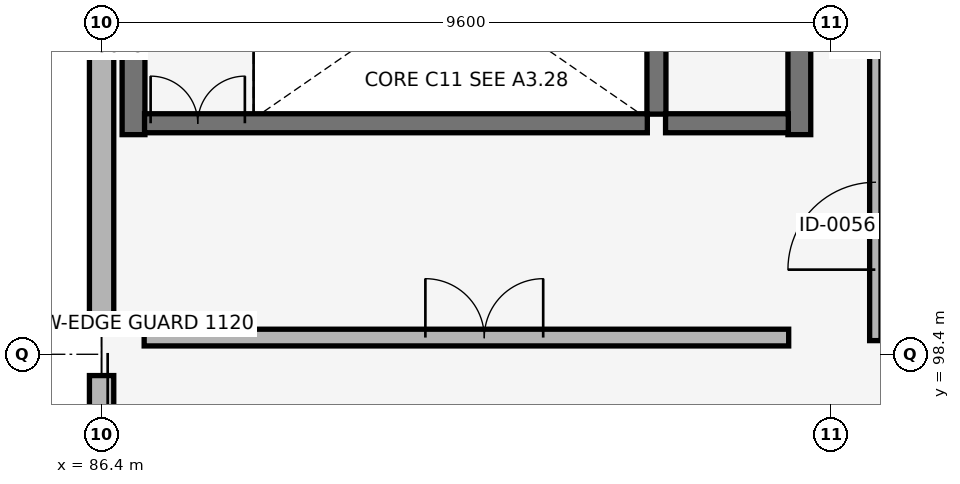
"""IFC4 building model, lengths in metres.
Left out: names, types, materials, properties, quantities, classifications, styles, units other than length and angle.
Written with IfcOpenShell. Run it as: python <this file> out.ifc"""

import sys

from ifc_helpers import new_model, si_unit, direction, frame, frame_2d, origin, place, context, subcontext, project, spatial, rectangle, extrude, element, fill, save


model = new_model("IFC4")
c1 = context("Model", 3, precision=1e-05, world=origin(), true_north=direction((0.0, 1.0)))
c2 = subcontext(c1, "Body", "Model", "MODEL_VIEW")
j1 = project(units=[si_unit("LENGTHUNIT", "METRE"), si_unit("PLANEANGLEUNIT", "RADIAN")], contexts=[c1])
p1 = place(None, origin())
s1 = spatial("IfcSite", under=j1, at=p1, CompositionType="ELEMENT")
p2 = place(p1, origin())
s2 = spatial("IfcBuilding", under=s1, at=p2, CompositionType="ELEMENT")
p3 = place(p2, frame((0.0, 0.0, 4.42)))
s3 = spatial("IfcBuildingStorey", under=s2, at=p3, CompositionType="ELEMENT", Elevation=4.42)
p4 = place(p3, frame((86.4, 98.12, 0.0), z_axis=(0.0, 0.0, 1.0), x_axis=(0.0, -1.0, 0.0)))
e1 = element("IfcWall", 1, at=p4, inside=s3, PredefinedType="SOLIDWALL", context=c2, shape_type="SweptSolid", body=[
    extrude(rectangle(XDim=6.64, YDim=0.32, at=frame_2d((3.32, 0.0))), origin(), (0.0, 0.0, 1.0), 3.63),
])
p5 = place(p4, frame((1.538, 0.0, 0.72)))
e2 = element("IfcOpeningElement", 2, at=p5, cuts=e1, PredefinedType="OPENING", context=c2, shape_type="SweptSolid", body=[
    extrude(rectangle(XDim=1.35, YDim=2.42, at=frame_2d((0.675, 1.21))), frame((0.0, 0.17, 0.0), z_axis=(0.0, -1.0, 0.0), x_axis=(1.0, 0.0, 0.0)), (0.0, 0.0, 1.0), 0.34),
])
p6 = place(p4, frame((3.752, 0.0, 0.72)))
e3 = element("IfcOpeningElement", 3, at=p6, cuts=e1, PredefinedType="OPENING", context=c2, shape_type="SweptSolid", body=[
    extrude(rectangle(XDim=1.35, YDim=2.42, at=frame_2d((0.675, 1.21))), frame((0.0, 0.17, 0.0), z_axis=(0.0, -1.0, 0.0), x_axis=(1.0, 0.0, 0.0)), (0.0, 0.0, 1.0), 0.34),
])
p7 = place(p3, frame((86.4, 105.3, 0.0), z_axis=(0.0, 0.0, 1.0), x_axis=(0.0, -1.0, 0.0)))
e4 = element("IfcWall", 4, at=p7, inside=s3, PredefinedType="SOLIDWALL", context=c2, shape_type="SweptSolid", body=[
    extrude(rectangle(XDim=6.62, YDim=0.32, at=frame_2d((3.31, 0.0))), origin(), (0.0, 0.0, 1.0), 3.63),
])
for number, where, z_axis, x_axis in (
    (5, (86.82, 101.29, 0.0), (0.0, 0.0, 1.0), (0.0, 1.0, 0.0)),
    (6, (95.58, 101.29, 0.0), (0.0, 0.0, 1.0), (0.0, 1.0, 0.0)),
):
    element("IfcWall", number, at=place(p3, frame(where, z_axis=z_axis, x_axis=x_axis)), inside=s3, PredefinedType="SHEAR", context=c2, shape_type="SweptSolid", body=[
        extrude(rectangle(XDim=4.1, YDim=0.3, at=frame_2d((2.05, 0.0))), origin(), (0.0, 0.0, 1.0), 3.8),
    ])
p8 = place(p3, frame((93.7, 101.56, 0.0), z_axis=(0.0, 0.0, 1.0), x_axis=(0.0, 1.0, 0.0)))
e7 = element("IfcWall", 7, at=p8, inside=s3, PredefinedType="SHEAR", context=c2, shape_type="SweptSolid", body=[
    extrude(rectangle(XDim=3.53, YDim=0.25, at=frame_2d((1.765, 0.0))), origin(), (0.0, 0.0, 1.0), 3.8),
])
p9 = place(p3, frame((86.965, 101.44, 0.0), z_axis=(0.0, 0.0, 1.0), x_axis=(1.0, 0.0, 0.0)))
e8 = element("IfcWall", 8, at=p9, inside=s3, PredefinedType="SHEAR", context=c2, shape_type="SweptSolid", body=[
    extrude(rectangle(XDim=6.615, YDim=0.25, at=frame_2d((3.308, 0.0))), origin(), (0.0, 0.0, 1.0), 3.8),
])
p10 = place(p9, frame((0.08, 0.0, 0.0)))
e9 = element("IfcOpeningElement", 9, at=p10, cuts=e8, PredefinedType="OPENING", context=c2, shape_type="SweptSolid", body=[
    extrude(rectangle(XDim=1.24, YDim=2.15, at=frame_2d((0.62, 1.075))), frame((0.0, 0.135, 0.0), z_axis=(0.0, -1.0, 0.0), x_axis=(1.0, 0.0, 0.0)), (0.0, 0.0, 1.0), 0.27),
])
p11 = place(p3, frame((86.96, 98.62, 0.0), z_axis=(0.0, 0.0, 1.0), x_axis=(1.0, 0.0, 0.0)))
e10 = element("IfcWall", 10, at=p11, inside=s3, PredefinedType="PARTITIONING", context=c2, shape_type="SweptSolid", body=[
    extrude(rectangle(XDim=8.48, YDim=0.22, at=frame_2d((4.24, 0.0))), origin(), (0.0, 0.0, 1.0), 3.75),
])
p12 = place(p11, frame((3.7, 0.0, 0.0)))
e11 = element("IfcOpeningElement", 11, at=p12, cuts=e10, PredefinedType="OPENING", context=c2, shape_type="SweptSolid", body=[
    extrude(rectangle(XDim=1.55, YDim=2.2, at=frame_2d((0.775, 1.1))), frame((0.0, 0.12, 0.0), z_axis=(0.0, -1.0, 0.0), x_axis=(1.0, 0.0, 0.0)), (0.0, 0.0, 1.0), 0.24),
])
p13 = place(p3, frame((93.82, 101.44, 0.0), z_axis=(0.0, 0.0, 1.0), x_axis=(1.0, 0.0, 0.0)))
e12 = element("IfcWall", 12, at=p13, inside=s3, PredefinedType="SHEAR", context=c2, shape_type="SweptSolid", body=[
    extrude(rectangle(XDim=1.615, YDim=0.25, at=frame_2d((0.808, 0.0))), origin(), (0.0, 0.0, 1.0), 3.8),
])
p14 = place(p3, frame((96.58, 98.58, 0.0), z_axis=(0.0, 0.0, 1.0), x_axis=(0.0, 1.0, 0.0)))
e13 = element("IfcWall", 13, at=p14, inside=s3, PredefinedType="PARTITIONING", context=c2, shape_type="SweptSolid", body=[
    extrude(rectangle(XDim=6.858, YDim=0.15, at=frame_2d((3.429, 0.0))), origin(), (0.0, 0.0, 1.0), 3.12),
])
p15 = place(p14, frame((0.934, 0.0, 0.0)))
e14 = element("IfcOpeningElement", 14, at=p15, cuts=e13, PredefinedType="OPENING", context=c2, shape_type="SweptSolid", body=[
    extrude(rectangle(XDim=1.15, YDim=2.1, at=frame_2d((0.575, 1.05))), frame((0.0, 0.085, 0.0), z_axis=(0.0, -1.0, 0.0), x_axis=(1.0, 0.0, 0.0)), (0.0, 0.0, 1.0), 0.17),
])
p16 = place(p10, origin())
e15 = element("IfcDoor", 15, at=p16, inside=s3, OperationType="DOUBLE_DOOR_SINGLE_SWING", PredefinedType="DOOR", context=c2, shape_type="SweptSolid", body=[
    extrude(rectangle(XDim=1.24, YDim=2.15, at=frame_2d((0.62, 1.075))), frame((0.0, 0.025, 0.0), z_axis=(0.0, -1.0, 0.0), x_axis=(1.0, 0.0, 0.0)), (0.0, 0.0, 1.0), 0.05),
])
fill(e9, e15)
p17 = place(p12, origin())
e16 = element("IfcDoor", 16, at=p17, inside=s3, OperationType="DOUBLE_DOOR_SINGLE_SWING", PredefinedType="DOOR", context=c2, shape_type="SweptSolid", body=[
    extrude(rectangle(XDim=1.55, YDim=2.2, at=frame_2d((0.775, 1.1))), frame((0.0, 0.025, 0.0), z_axis=(0.0, -1.0, 0.0), x_axis=(1.0, 0.0, 0.0)), (0.0, 0.0, 1.0), 0.05),
])
fill(e11, e16)
p18 = place(p15, origin())
e17 = element("IfcDoor", 17, at=p18, inside=s3, OperationType="SINGLE_SWING_LEFT", PredefinedType="DOOR", context=c2, shape_type="SweptSolid", body=[
    extrude(rectangle(XDim=1.15, YDim=2.1, at=frame_2d((0.575, 1.05))), frame((0.0, 0.025, 0.0), z_axis=(0.0, -1.0, 0.0), x_axis=(1.0, 0.0, 0.0)), (0.0, 0.0, 1.0), 0.05),
])
fill(e14, e17)
save(model, sys.argv[1])
